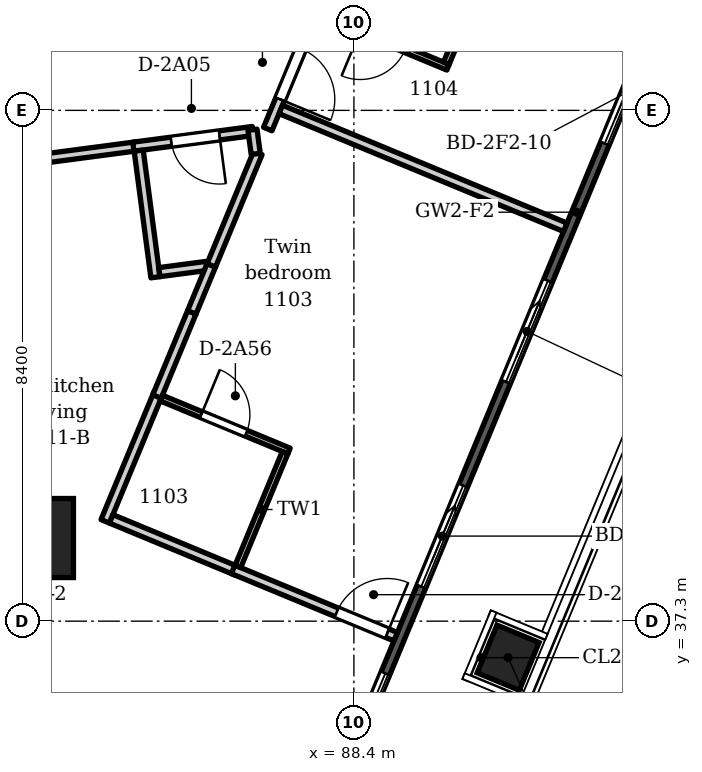
"""IFC4 building model, lengths in metres.
Left out: names, types, materials, properties, quantities, classifications, styles, units other than length and angle.
Written with IfcOpenShell. Run it as: python <this file> out.ifc"""

import sys

from ifc_helpers import new_model, si_unit, direction, frame, frame_2d, origin, origin_2d, place, context, subcontext, project, spatial, polyline, rectangle, circle, outline, extrude, element, fill, save


model = new_model("IFC4")
c1 = context("Model", 3, precision=1e-05, world=origin(), true_north=direction((0.0, 1.0)))
c2 = subcontext(c1, "Body", "Model", "MODEL_VIEW")
j1 = project(units=[si_unit("LENGTHUNIT", "METRE"), si_unit("PLANEANGLEUNIT", "RADIAN")], contexts=[c1])
p1 = place(None, origin())
s1 = spatial("IfcSite", under=j1, at=p1, CompositionType="ELEMENT")
p2 = place(p1, origin())
s2 = spatial("IfcBuilding", under=s1, at=p2, CompositionType="ELEMENT")
p3 = place(p2, frame((0.0, 0.0, 50.4)))
s3 = spatial("IfcBuildingStorey", under=s2, at=p3, CompositionType="ELEMENT", Elevation=50.4)
p4 = place(p3, frame((90.936, 36.7, -0.35), z_axis=(0.0, 0.0, 1.0), x_axis=(0.382683432365, 0.923879532511, 0.0)))
e1 = element("IfcColumn", 1, at=p4, inside=s3, PredefinedType="COLUMN", context=c2, shape_type="SweptSolid", body=[
    extrude(rectangle(XDim=0.85, YDim=0.75, at=origin_2d()), origin(), (0.0, 0.0, 1.0), 3.95),
])
p5 = place(p3, frame((83.138, 38.667, -0.35), z_axis=(0.0, 0.0, 1.0), x_axis=(1.0, 0.0, 0.0)))
e2 = element("IfcColumn", 2, at=p5, inside=s3, PredefinedType="COLUMN", context=c2, shape_type="SweptSolid", body=[
    extrude(circle(Radius=0.65, at=origin_2d()), origin(), (0.0, 0.0, 1.0), 3.95),
])
p6 = place(p3, frame((105.889, 77.411, 0.0), z_axis=(0.0, 0.0, 1.0), x_axis=(-0.38268395344, -0.923879316675, 0.0)))
e3 = element("IfcWall", 3, at=p6, inside=s3, PredefinedType="SOLIDWALL", context=c2, shape_type="SweptSolid", body=[
    extrude(outline(polyline([(0.149, 0.075), (0.149, -0.075), (47.217, -0.075), (47.217, 0.075), (0.149, 0.075)])), origin(), (0.0, 0.0, 1.0), 3.3),
])
p7 = place(p6, frame((1.222, 0.0, 0.0)))
e4 = element("IfcOpeningElement", 4, at=p7, cuts=e3, PredefinedType="OPENING", context=c2, shape_type="SweptSolid", body=[
    extrude(rectangle(XDim=1.8, YDim=2.6, at=frame_2d((0.9, 1.3))), frame((0.0, 0.085, 0.0), z_axis=(0.0, -1.0, 0.0), x_axis=(1.0, 0.0, 0.0)), (0.0, 0.0, 1.0), 0.17),
])
p8 = place(p6, frame((4.565, 0.0, 0.0)))
e5 = element("IfcOpeningElement", 5, at=p8, cuts=e3, PredefinedType="OPENING", context=c2, shape_type="SweptSolid", body=[
    extrude(rectangle(XDim=1.8, YDim=2.6, at=frame_2d((0.9, 1.3))), frame((0.0, 0.085, 0.0), z_axis=(0.0, -1.0, 0.0), x_axis=(1.0, 0.0, 0.0)), (0.0, 0.0, 1.0), 0.17),
])
p9 = place(p6, frame((8.209, 0.0, 0.0)))
e6 = element("IfcOpeningElement", 6, at=p9, cuts=e3, PredefinedType="OPENING", context=c2, shape_type="SweptSolid", body=[
    extrude(rectangle(XDim=1.8, YDim=2.6, at=frame_2d((0.9, 1.3))), frame((0.0, 0.085, 0.0), z_axis=(0.0, -1.0, 0.0), x_axis=(1.0, 0.0, 0.0)), (0.0, 0.0, 1.0), 0.17),
])
p10 = place(p6, frame((12.453, 0.0, 0.0)))
e7 = element("IfcOpeningElement", 7, at=p10, cuts=e3, PredefinedType="OPENING", context=c2, shape_type="SweptSolid", body=[
    extrude(rectangle(XDim=1.8, YDim=2.6, at=frame_2d((0.9, 1.3))), frame((0.0, 0.085, 0.0), z_axis=(0.0, -1.0, 0.0), x_axis=(1.0, 0.0, 0.0)), (0.0, 0.0, 1.0), 0.17),
])
p11 = place(p6, frame((15.496, 0.0, 0.0)))
e8 = element("IfcOpeningElement", 8, at=p11, cuts=e3, PredefinedType="OPENING", context=c2, shape_type="SweptSolid", body=[
    extrude(rectangle(XDim=1.8, YDim=2.6, at=frame_2d((0.9, 1.3))), frame((0.0, 0.085, 0.0), z_axis=(0.0, -1.0, 0.0), x_axis=(1.0, 0.0, 0.0)), (0.0, 0.0, 1.0), 0.17),
])
p12 = place(p6, frame((18.84, 0.0, 0.15)))
e9 = element("IfcOpeningElement", 9, at=p12, cuts=e3, PredefinedType="OPENING", context=c2, shape_type="SweptSolid", body=[
    extrude(rectangle(XDim=2.4, YDim=2.45, at=frame_2d((1.2, 1.225))), frame((0.0, 0.085, 0.0), z_axis=(0.0, -1.0, 0.0), x_axis=(1.0, 0.0, 0.0)), (0.0, 0.0, 1.0), 0.17),
])
p13 = place(p6, frame((22.783, 0.0, 0.0)))
e10 = element("IfcOpeningElement", 10, at=p13, cuts=e3, PredefinedType="OPENING", context=c2, shape_type="SweptSolid", body=[
    extrude(rectangle(XDim=1.8, YDim=2.6, at=frame_2d((0.9, 1.3))), frame((0.0, 0.085, 0.0), z_axis=(0.0, -1.0, 0.0), x_axis=(1.0, 0.0, 0.0)), (0.0, 0.0, 1.0), 0.17),
])
p14 = place(p6, frame((26.127, 0.0, 0.15)))
e11 = element("IfcOpeningElement", 11, at=p14, cuts=e3, PredefinedType="OPENING", context=c2, shape_type="SweptSolid", body=[
    extrude(rectangle(XDim=2.4, YDim=2.45, at=frame_2d((1.2, 1.225))), frame((0.0, 0.085, 0.0), z_axis=(0.0, -1.0, 0.0), x_axis=(1.0, 0.0, 0.0)), (0.0, 0.0, 1.0), 0.17),
])
p15 = place(p6, frame((30.071, 0.0, 0.0)))
e12 = element("IfcOpeningElement", 12, at=p15, cuts=e3, PredefinedType="OPENING", context=c2, shape_type="SweptSolid", body=[
    extrude(rectangle(XDim=1.8, YDim=2.6, at=frame_2d((0.9, 1.3))), frame((0.0, 0.085, 0.0), z_axis=(0.0, -1.0, 0.0), x_axis=(1.0, 0.0, 0.0)), (0.0, 0.0, 1.0), 0.17),
])
p16 = place(p6, frame((33.114, 0.0, 0.0)))
e13 = element("IfcOpeningElement", 13, at=p16, cuts=e3, PredefinedType="OPENING", context=c2, shape_type="SweptSolid", body=[
    extrude(rectangle(XDim=1.8, YDim=2.6, at=frame_2d((0.9, 1.3))), frame((0.0, 0.085, 0.0), z_axis=(0.0, -1.0, 0.0), x_axis=(1.0, 0.0, 0.0)), (0.0, 0.0, 1.0), 0.17),
])
p17 = place(p6, frame((37.358, 0.0, 0.0)))
e14 = element("IfcOpeningElement", 14, at=p17, cuts=e3, PredefinedType="OPENING", context=c2, shape_type="SweptSolid", body=[
    extrude(rectangle(XDim=1.8, YDim=2.6, at=frame_2d((0.9, 1.3))), frame((0.0, 0.085, 0.0), z_axis=(0.0, -1.0, 0.0), x_axis=(1.0, 0.0, 0.0)), (0.0, 0.0, 1.0), 0.17),
])
p18 = place(p6, frame((41.001, 0.0, 0.0)))
e15 = element("IfcOpeningElement", 15, at=p18, cuts=e3, PredefinedType="OPENING", context=c2, shape_type="SweptSolid", body=[
    extrude(rectangle(XDim=1.8, YDim=2.6, at=frame_2d((0.9, 1.3))), frame((0.0, 0.085, 0.0), z_axis=(0.0, -1.0, 0.0), x_axis=(1.0, 0.0, 0.0)), (0.0, 0.0, 1.0), 0.17),
])
p19 = place(p6, frame((44.345, 0.0, 0.0)))
e16 = element("IfcOpeningElement", 16, at=p19, cuts=e3, PredefinedType="OPENING", context=c2, shape_type="SweptSolid", body=[
    extrude(rectangle(XDim=1.8, YDim=2.6, at=frame_2d((0.9, 1.3))), frame((0.0, 0.085, 0.0), z_axis=(0.0, -1.0, 0.0), x_axis=(1.0, 0.0, 0.0)), (0.0, 0.0, 1.0), 0.17),
])
p20 = place(p3, frame((78.586, 46.178, 0.0), z_axis=(0.0, 0.0, 1.0), x_axis=(0.991437356371, 0.130583185714, 0.0)))
e17 = element("IfcWall", 17, at=p20, inside=s3, PredefinedType="PARTITIONING", context=c2, shape_type="SweptSolid", body=[
    extrude(rectangle(XDim=7.215, YDim=0.15, at=frame_2d((3.607, 0.0))), origin(), (0.0, 0.0, 1.0), 2.75),
])
p21 = place(p20, frame((3.12, 0.0, 0.0)))
e18 = element("IfcOpeningElement", 18, at=p21, cuts=e17, PredefinedType="OPENING", context=c2, shape_type="SweptSolid", body=[
    extrude(rectangle(XDim=0.9, YDim=2.1, at=frame_2d((0.45, 1.05))), frame((0.0, 0.085, 0.0), z_axis=(0.0, -1.0, 0.0), x_axis=(1.0, 0.0, 0.0)), (0.0, 0.0, 1.0), 0.17),
])
p22 = place(p3, frame((82.333, 44.78, 0.0), z_axis=(0.0, 0.0, 1.0), x_axis=(0.991416071527, 0.130744686764, 0.0)))
e19 = element("IfcWall", 19, at=p22, inside=s3, PredefinedType="PARTITIONING", context=c2, shape_type="SweptSolid", body=[
    extrude(rectangle(XDim=2.525, YDim=0.15, at=frame_2d((1.262, 0.0))), origin(), (0.0, 0.0, 1.0), 2.75),
])
p23 = place(p3, frame((84.31, 38.942, 0.0), z_axis=(0.0, 0.0, 1.0), x_axis=(0.382789938294, 0.923835409118, 0.0)))
e20 = element("IfcWall", 20, at=p23, inside=s3, PredefinedType="PARTITIONING", context=c2, shape_type="SweptSolid", body=[
    extrude(rectangle(XDim=2.28, YDim=0.15, at=frame_2d((1.14, 0.0))), origin(), (0.0, 0.0, 1.0), 3.3),
])
p24 = place(p3, frame((84.408, 38.982, 0.0), z_axis=(0.0, 0.0, 1.0), x_axis=(0.923765743921, -0.382958026888, 0.0)))
e21 = element("IfcWall", 21, at=p24, inside=s3, PredefinedType="PARTITIONING", context=c2, shape_type="SweptSolid", body=[
    extrude(rectangle(XDim=2.229, YDim=0.15, at=frame_2d((1.114, 0.0))), origin(), (0.0, 0.0, 1.0), 3.3),
])
p25 = place(p3, frame((84.773, 45.102, 0.0), z_axis=(0.0, 0.0, 1.0), x_axis=(0.991450105095, 0.130486356022, 0.0)))
e22 = element("IfcWall", 22, at=p25, inside=s3, PredefinedType="PARTITIONING", context=c2, shape_type="SweptSolid", body=[
    extrude(rectangle(XDim=1.983, YDim=0.15, at=frame_2d((0.992, 0.0))), origin(), (0.0, 0.0, 1.0), 3.3),
])
p26 = place(p25, frame((0.629, 0.0, 0.0)))
e23 = element("IfcOpeningElement", 23, at=p26, cuts=e22, PredefinedType="OPENING", context=c2, shape_type="SweptSolid", body=[
    extrude(rectangle(XDim=0.8, YDim=2.1, at=frame_2d((0.4, 1.05))), frame((0.0, 0.085, 0.0), z_axis=(0.0, -1.0, 0.0), x_axis=(1.0, 0.0, 0.0)), (0.0, 0.0, 1.0), 0.17),
])
p27 = place(p3, frame((84.861, 45.038, 0.0), z_axis=(0.0, 0.0, 1.0), x_axis=(0.130899564309, -0.991395634479, 0.0)))
e24 = element("IfcWall", 24, at=p27, inside=s3, PredefinedType="PARTITIONING", context=c2, shape_type="SweptSolid", body=[
    extrude(rectangle(XDim=2.1, YDim=0.15, at=frame_2d((1.05, 0.0))), origin(), (0.0, 0.0, 1.0), 3.3),
])
p28 = place(p3, frame((85.2, 43.04, 0.0), z_axis=(0.0, 0.0, 1.0), x_axis=(0.991515431038, 0.129989038049, 0.0)))
e25 = element("IfcWall", 25, at=p28, inside=s3, PredefinedType="PARTITIONING", context=c2, shape_type="SweptSolid", body=[
    extrude(rectangle(XDim=0.787, YDim=0.15, at=frame_2d((0.394, 0.0))), origin(), (0.0, 0.0, 1.0), 3.3),
])
p29 = place(p3, frame((85.161, 40.994, 0.0), z_axis=(0.0, 0.0, 1.0), x_axis=(0.382519732759, 0.923947322118, 0.0)))
e26 = element("IfcWall", 26, at=p29, inside=s3, PredefinedType="PARTITIONING", context=c2, shape_type="SweptSolid", body=[
    extrude(rectangle(XDim=1.498, YDim=0.15, at=frame_2d((0.749, 0.0))), origin(), (0.0, 0.0, 1.0), 3.3),
])
p30 = place(p3, frame((85.231, 40.969, 0.0), z_axis=(0.0, 0.0, 1.0), x_axis=(0.923931833824, -0.382557141415, 0.0)))
e27 = element("IfcWall", 27, at=p30, inside=s3, PredefinedType="PARTITIONING", context=c2, shape_type="SweptSolid", body=[
    extrude(rectangle(XDim=2.275, YDim=0.1, at=frame_2d((1.138, 0.0))), origin(), (0.0, 0.0, 1.0), 3.3),
])
p31 = place(p30, frame((0.712, 0.0, 0.0)))
e28 = element("IfcOpeningElement", 28, at=p31, cuts=e27, PredefinedType="OPENING", context=c2, shape_type="SweptSolid", body=[
    extrude(rectangle(XDim=0.8, YDim=2.1, at=frame_2d((0.4, 1.05))), frame((0.0, 0.06, 0.0), z_axis=(0.0, -1.0, 0.0), x_axis=(1.0, 0.0, 0.0)), (0.0, 0.0, 1.0), 0.12),
])
p32 = place(p3, frame((85.734, 42.378, 0.0), z_axis=(0.0, 0.0, 1.0), x_axis=(0.383063523393, 0.923722002036, 0.0)))
e29 = element("IfcWall", 29, at=p32, inside=s3, PredefinedType="PARTITIONING", context=c2, shape_type="SweptSolid", body=[
    extrude(rectangle(XDim=0.838, YDim=0.15, at=frame_2d((0.419, 0.0))), origin(), (0.0, 0.0, 1.0), 3.3),
])
p33 = place(p3, frame((86.055, 43.152, 0.0), z_axis=(0.0, 0.0, 1.0), x_axis=(0.382829605696, 0.923818971987, 0.0)))
e30 = element("IfcWall", 30, at=p33, inside=s3, PredefinedType="PARTITIONING", context=c2, shape_type="SweptSolid", body=[
    extrude(rectangle(XDim=2.0, YDim=0.15, at=frame_2d((1.0, 0.0))), origin(), (0.0, 0.0, 1.0), 3.3),
])
p34 = place(p3, frame((86.414, 38.151, 0.0), z_axis=(0.0, 0.0, 1.0), x_axis=(0.923916054036, -0.382595249703, 0.0)))
e31 = element("IfcWall", 31, at=p34, inside=s3, PredefinedType="PARTITIONING", context=c2, shape_type="SweptSolid", body=[
    extrude(rectangle(XDim=2.893, YDim=0.15, at=frame_2d((1.447, 0.0))), origin(), (0.0, 0.0, 1.0), 3.3),
])
p35 = place(p34, frame((1.843, 0.0, 0.0)))
e32 = element("IfcOpeningElement", 32, at=p35, cuts=e31, PredefinedType="OPENING", context=c2, shape_type="SweptSolid", body=[
    extrude(rectangle(XDim=0.9, YDim=2.1, at=frame_2d((0.45, 1.05))), frame((0.0, 0.085, 0.0), z_axis=(0.0, -1.0, 0.0), x_axis=(1.0, 0.0, 0.0)), (0.0, 0.0, 1.0), 0.17),
])
p36 = place(p3, frame((86.493, 38.2, 0.0), z_axis=(0.0, 0.0, 1.0), x_axis=(0.382646278951, 0.923894921084, 0.0)))
e33 = element("IfcWall", 33, at=p36, inside=s3, PredefinedType="PARTITIONING", context=c2, shape_type="SweptSolid", body=[
    extrude(rectangle(XDim=2.026, YDim=0.1, at=frame_2d((1.013, 0.0))), origin(), (0.0, 0.0, 1.0), 3.3),
])
p37 = place(p3, frame((86.732, 45.381, 0.0), z_axis=(0.0, 0.0, 1.0), x_axis=(0.131843859112, -0.99127049629, 0.0)))
e34 = element("IfcWall", 34, at=p37, inside=s3, PredefinedType="PARTITIONING", context=c2, shape_type="SweptSolid", body=[
    extrude(rectangle(XDim=0.4, YDim=0.15, at=frame_2d((0.2, 0.0))), origin(), (0.0, 0.0, 1.0), 3.3),
])
p38 = place(p3, frame((86.983, 45.393, 0.0), z_axis=(0.0, 0.0, 1.0), x_axis=(0.382618621816, 0.923906375257, 0.0)))
e35 = element("IfcWall", 35, at=p38, inside=s3, PredefinedType="PARTITIONING", context=c2, shape_type="SweptSolid", body=[
    extrude(rectangle(XDim=2.128, YDim=0.15, at=frame_2d((1.064, 0.0))), origin(), (0.0, 0.0, 1.0), 3.3),
])
p39 = place(p38, frame((0.53, 0.0, 0.0)))
e36 = element("IfcOpeningElement", 36, at=p39, cuts=e35, PredefinedType="OPENING", context=c2, shape_type="SweptSolid", body=[
    extrude(rectangle(XDim=0.9, YDim=2.1, at=frame_2d((0.45, 1.05))), frame((0.0, 0.085, 0.0), z_axis=(0.0, -1.0, 0.0), x_axis=(1.0, 0.0, 0.0)), (0.0, 0.0, 1.0), 0.17),
])
p40 = place(p3, frame((87.197, 45.715, 0.0), z_axis=(0.0, 0.0, 1.0), x_axis=(0.923879340067, -0.382683896966, 0.0)))
e37 = element("IfcWall", 37, at=p40, inside=s3, PredefinedType="PARTITIONING", context=c2, shape_type="SweptSolid", body=[
    extrude(rectangle(XDim=5.064, YDim=0.15, at=frame_2d((2.532, 0.0))), origin(), (0.0, 0.0, 1.0), 3.3),
])
p41 = place(p3, frame((87.845, 47.28, 0.0), z_axis=(0.0, 0.0, 1.0), x_axis=(0.92378006954, -0.382923469012, 0.0)))
e38 = element("IfcWall", 38, at=p41, inside=s3, PredefinedType="PARTITIONING", context=c2, shape_type="SweptSolid", body=[
    extrude(rectangle(XDim=2.275, YDim=0.1, at=frame_2d((1.138, 0.0))), origin(), (0.0, 0.0, 1.0), 3.3),
])
p42 = place(p41, frame((0.713, 0.0, 0.0)))
e39 = element("IfcOpeningElement", 39, at=p42, cuts=e38, PredefinedType="OPENING", context=c2, shape_type="SweptSolid", body=[
    extrude(rectangle(XDim=0.8, YDim=2.1, at=frame_2d((0.4, 1.05))), frame((0.0, 0.06, 0.0), z_axis=(0.0, -1.0, 0.0), x_axis=(1.0, 0.0, 0.0)), (0.0, 0.0, 1.0), 0.12),
])
p43 = place(p3, frame((89.92, 46.474, 0.0), z_axis=(0.0, 0.0, 1.0), x_axis=(0.382525049986, 0.923945120737, 0.0)))
e40 = element("IfcWall", 40, at=p43, inside=s3, PredefinedType="PARTITIONING", context=c2, shape_type="SweptSolid", body=[
    extrude(rectangle(XDim=1.825, YDim=0.1, at=frame_2d((0.913, 0.0))), origin(), (0.0, 0.0, 1.0), 3.3),
])
p44 = place(p16, origin())
e41 = element("IfcDoor", 41, at=p44, inside=s3, OperationType="SLIDING_TO_LEFT", PredefinedType="DOOR", context=c2, shape_type="SweptSolid", body=[
    extrude(rectangle(XDim=1.8, YDim=2.6, at=frame_2d((0.9, 1.3))), frame((0.0, 0.025, 0.0), z_axis=(0.0, -1.0, 0.0), x_axis=(1.0, 0.0, 0.0)), (0.0, 0.0, 1.0), 0.05),
])
fill(e13, e41)
p45 = place(p17, origin())
e42 = element("IfcDoor", 42, at=p45, inside=s3, OperationType="SLIDING_TO_LEFT", PredefinedType="DOOR", context=c2, shape_type="SweptSolid", body=[
    extrude(rectangle(XDim=1.8, YDim=2.6, at=frame_2d((0.9, 1.3))), frame((0.0, 0.025, 0.0), z_axis=(0.0, -1.0, 0.0), x_axis=(1.0, 0.0, 0.0)), (0.0, 0.0, 1.0), 0.05),
])
fill(e14, e42)
p46 = place(p18, origin())
e43 = element("IfcDoor", 43, at=p46, inside=s3, OperationType="SLIDING_TO_LEFT", PredefinedType="DOOR", context=c2, shape_type="SweptSolid", body=[
    extrude(rectangle(XDim=1.8, YDim=2.6, at=frame_2d((0.9, 1.3))), frame((0.0, 0.025, 0.0), z_axis=(0.0, -1.0, 0.0), x_axis=(1.0, 0.0, 0.0)), (0.0, 0.0, 1.0), 0.05),
])
fill(e15, e43)
p47 = place(p19, origin())
e44 = element("IfcDoor", 44, at=p47, inside=s3, OperationType="SLIDING_TO_LEFT", PredefinedType="DOOR", context=c2, shape_type="SweptSolid", body=[
    extrude(rectangle(XDim=1.8, YDim=2.6, at=frame_2d((0.9, 1.3))), frame((0.0, 0.025, 0.0), z_axis=(0.0, -1.0, 0.0), x_axis=(1.0, 0.0, 0.0)), (0.0, 0.0, 1.0), 0.05),
])
fill(e16, e44)
p48 = place(p26, frame((0.8, 0.0, 0.0), z_axis=(0.0, 0.0, 1.0), x_axis=(-1.0, 0.0, 0.0)))
e45 = element("IfcDoor", 45, at=p48, inside=s3, OperationType="SINGLE_SWING_LEFT", PredefinedType="DOOR", context=c2, shape_type="SweptSolid", body=[
    extrude(rectangle(XDim=0.8, YDim=2.1, at=frame_2d((0.4, 1.05))), frame((0.0, 0.025, 0.0), z_axis=(0.0, -1.0, 0.0), x_axis=(1.0, 0.0, 0.0)), (0.0, 0.0, 1.0), 0.05),
])
fill(e23, e45)
p49 = place(p39, frame((0.9, 0.0, 0.0), z_axis=(0.0, 0.0, 1.0), x_axis=(-1.0, 0.0, 0.0)))
e46 = element("IfcDoor", 46, at=p49, inside=s3, OperationType="SINGLE_SWING_RIGHT", PredefinedType="DOOR", context=c2, shape_type="SweptSolid", body=[
    extrude(rectangle(XDim=0.9, YDim=2.1, at=frame_2d((0.45, 1.05))), frame((0.0, 0.025, 0.0), z_axis=(0.0, -1.0, 0.0), x_axis=(1.0, 0.0, 0.0)), (0.0, 0.0, 1.0), 0.05),
])
fill(e36, e46)
p50 = place(p35, origin())
e47 = element("IfcDoor", 47, at=p50, inside=s3, OperationType="SINGLE_SWING_RIGHT", PredefinedType="DOOR", context=c2, shape_type="SweptSolid", body=[
    extrude(rectangle(XDim=0.9, YDim=2.1, at=frame_2d((0.45, 1.05))), frame((0.0, 0.025, 0.0), z_axis=(0.0, -1.0, 0.0), x_axis=(1.0, 0.0, 0.0)), (0.0, 0.0, 1.0), 0.05),
])
fill(e32, e47)
p51 = place(p31, origin())
e48 = element("IfcDoor", 48, at=p51, inside=s3, OperationType="SINGLE_SWING_LEFT", PredefinedType="DOOR", context=c2, shape_type="SweptSolid", body=[
    extrude(rectangle(XDim=0.8, YDim=2.1, at=frame_2d((0.4, 1.05))), frame((0.0, 0.025, 0.0), z_axis=(0.0, -1.0, 0.0), x_axis=(1.0, 0.0, 0.0)), (0.0, 0.0, 1.0), 0.05),
])
fill(e28, e48)
save(model, sys.argv[1])
